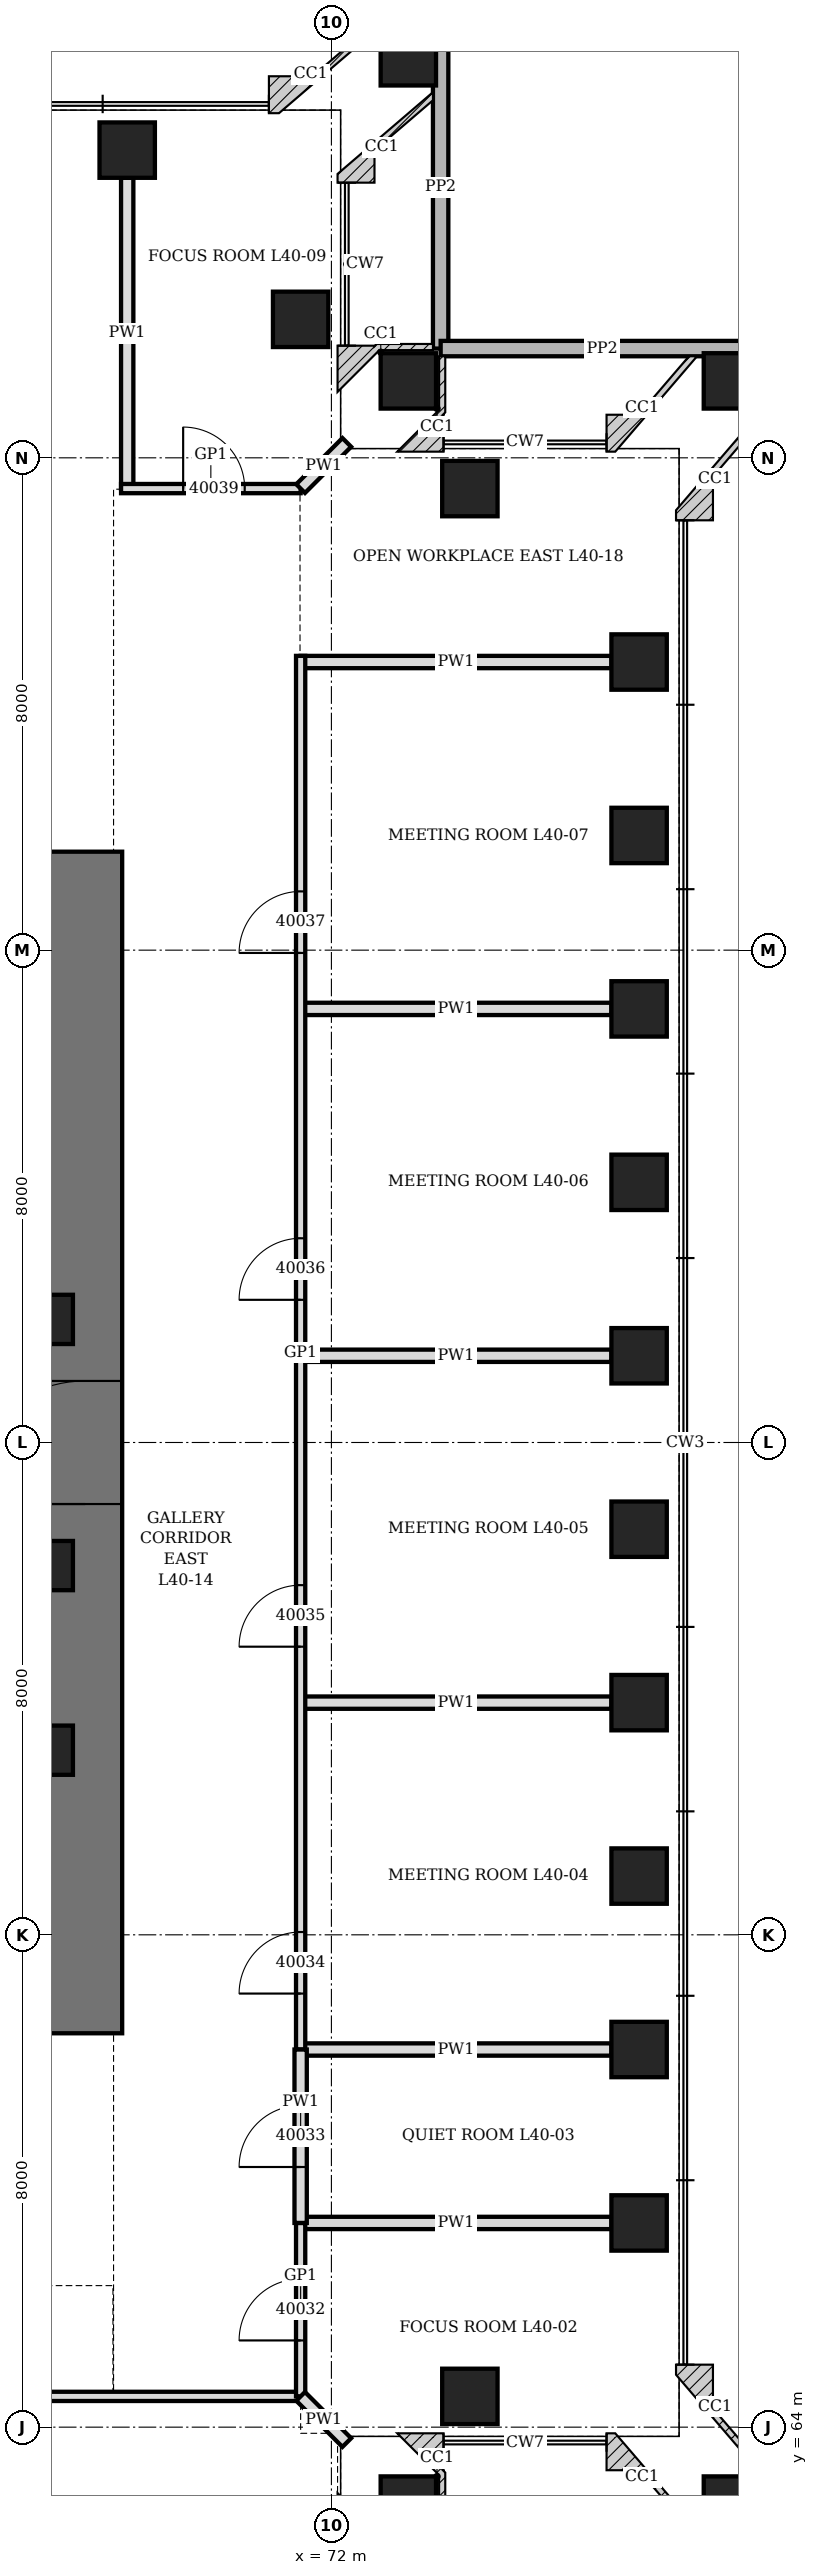
"""IFC4 building model, lengths in metres.
Left out: names, types, materials, properties, quantities, classifications, styles, units other than length and angle.
Written with IfcOpenShell. Run it as: python <this file> out.ifc"""

import sys

from ifc_helpers import new_model, si_unit, direction, frame, frame_2d, origin, origin_2d, place, context, subcontext, project, spatial, rectangle, hollow_rectangle, extrude, clip, halfspace, element, fill, save


model = new_model("IFC4")
c1 = context("Model", 3, precision=1e-05, world=origin(), true_north=direction((0.0, 1.0)))
c2 = subcontext(c1, "Body", "Model", "MODEL_VIEW")
j1 = project(units=[si_unit("LENGTHUNIT", "METRE"), si_unit("PLANEANGLEUNIT", "RADIAN")], contexts=[c1])
p1 = place(None, origin())
s1 = spatial("IfcSite", under=j1, at=p1, CompositionType="ELEMENT")
p2 = place(p1, origin())
s2 = spatial("IfcBuilding", under=s1, at=p2, CompositionType="ELEMENT")
p3 = place(p2, frame((0.0, 0.0, 181.3)))
s3 = spatial("IfcBuildingStorey", under=s2, at=p3, CompositionType="ELEMENT", Elevation=181.3)
p4 = place(p3, frame((73.25, 62.75, -0.25), z_axis=(-0.343685624304, 0.343685624304, 0.873933855216), x_axis=(-0.707106781187, -0.707106781187, 0.0)))
e1 = element("IfcColumn", 1, at=p4, inside=s3, PredefinedType="COLUMN", context=c2, shape_type="Clipping", body=[
    clip(clip(extrude(hollow_rectangle(XDim=0.9, YDim=0.9, WallThickness=0.15, at=origin_2d()), origin(), (0.0, 0.0, 1.0), 5.092), halfspace(frame((0.0, 0.0, 0.253), z_axis=(0.0, 0.0, 1.0), x_axis=(1.0, 0.0, 0.0)), True)), halfspace(frame((0.0, 0.0, 4.839), z_axis=(0.0, 0.0, -1.0), x_axis=(1.0, 0.0, 0.0)), True)),
])
p5 = place(p3, frame((74.25, 64.5, -0.25), z_axis=(0.0, 0.0, 1.0), x_axis=(1.0, 0.0, 0.0)))
e2 = element("IfcColumn", 2, at=p5, inside=s3, PredefinedType="COLUMN", context=c2, shape_type="SweptSolid", body=[
    extrude(hollow_rectangle(XDim=0.9, YDim=0.9, WallThickness=0.15, at=origin_2d()), origin(), (0.0, 0.0, 1.0), 4.45),
])
p6 = place(p3, frame((78.5, 62.75, -0.25), z_axis=(-0.299314960964, 0.349200787792, 0.887957974202), x_axis=(-0.759256602365, -0.650791373456, 0.0)))
e3 = element("IfcColumn", 3, at=p6, inside=s3, PredefinedType="COLUMN", context=c2, shape_type="Clipping", body=[
    clip(clip(extrude(hollow_rectangle(XDim=0.9, YDim=0.9, WallThickness=0.15, at=origin_2d()), origin(), (0.0, 0.0, 1.0), 5.011), halfspace(frame((0.0, 0.0, 0.235), z_axis=(0.0, 0.0, 1.0), x_axis=(1.0, 0.0, 0.0)), True)), halfspace(frame((0.0, 0.0, 4.776), z_axis=(0.0, 0.0, -1.0), x_axis=(1.0, 0.0, 0.0)), True)),
])
for number, where, z_axis, x_axis in (
    (4, (77.0, 67.318, -0.25), (0.0, 0.0, 1.0), (0.0, 1.0, 0.0)),
    (5, (77.0, 70.136, -0.25), (0.0, 0.0, 1.0), (0.0, 1.0, 0.0)),
    (6, (77.0, 72.955, -0.25), (0.0, 0.0, 1.0), (0.0, 1.0, 0.0)),
    (7, (77.0, 75.773, -0.25), (0.0, 0.0, 1.0), (0.0, 1.0, 0.0)),
    (8, (77.0, 78.591, -0.25), (0.0, 0.0, 1.0), (0.0, 1.0, 0.0)),
    (9, (77.0, 81.409, -0.25), (0.0, 0.0, 1.0), (0.0, 1.0, 0.0)),
    (10, (77.0, 84.227, -0.25), (0.0, 0.0, 1.0), (0.0, 1.0, 0.0)),
    (11, (77.0, 87.045, -0.25), (0.0, 0.0, 1.0), (0.0, 1.0, 0.0)),
    (12, (77.0, 89.864, -0.25), (0.0, 0.0, 1.0), (0.0, 1.0, 0.0)),
    (13, (77.0, 92.682, -0.25), (0.0, 0.0, 1.0), (0.0, 1.0, 0.0)),
):
    element("IfcColumn", number, at=place(p3, frame(where, z_axis=z_axis, x_axis=x_axis)), inside=s3, PredefinedType="COLUMN", context=c2, shape_type="SweptSolid", body=[
        extrude(hollow_rectangle(XDim=0.9, YDim=0.9, WallThickness=0.15, at=origin_2d()), origin(), (0.0, 0.0, 1.0), 4.45),
    ])
p7 = place(p3, frame((78.5, 97.25, -0.25), z_axis=(-0.299314960964, -0.349200787792, 0.887957974202), x_axis=(0.759256602365, -0.650791373456, 0.0)))
e14 = element("IfcColumn", 14, at=p7, inside=s3, PredefinedType="COLUMN", context=c2, shape_type="Clipping", body=[
    clip(clip(extrude(hollow_rectangle(XDim=0.9, YDim=0.9, WallThickness=0.15, at=origin_2d()), origin(), (0.0, 0.0, 1.0), 5.011), halfspace(frame((0.0, 0.0, 0.235), z_axis=(0.0, 0.0, 1.0), x_axis=(1.0, 0.0, 0.0)), True)), halfspace(frame((0.0, 0.0, 4.776), z_axis=(0.0, 0.0, -1.0), x_axis=(1.0, 0.0, 0.0)), True)),
])
p8 = place(p3, frame((74.25, 95.5, -0.25), z_axis=(0.0, 0.0, 1.0), x_axis=(1.0, 0.0, 0.0)))
e15 = element("IfcColumn", 15, at=p8, inside=s3, PredefinedType="COLUMN", context=c2, shape_type="SweptSolid", body=[
    extrude(hollow_rectangle(XDim=0.9, YDim=0.9, WallThickness=0.15, at=origin_2d()), origin(), (0.0, 0.0, 1.0), 4.45),
])
p9 = place(p3, frame((73.25, 97.25, -0.25), z_axis=(-0.343685624304, -0.343685624304, 0.873933855216), x_axis=(0.707106781187, -0.707106781187, 0.0)))
e16 = element("IfcColumn", 16, at=p9, inside=s3, PredefinedType="COLUMN", context=c2, shape_type="Clipping", body=[
    clip(clip(extrude(hollow_rectangle(XDim=0.9, YDim=0.9, WallThickness=0.15, at=origin_2d()), origin(), (0.0, 0.0, 1.0), 5.092), halfspace(frame((0.0, 0.0, 0.253), z_axis=(0.0, 0.0, 1.0), x_axis=(1.0, 0.0, 0.0)), True)), halfspace(frame((0.0, 0.0, 4.839), z_axis=(0.0, 0.0, -1.0), x_axis=(1.0, 0.0, 0.0)), True)),
])
p10 = place(p3, frame((71.5, 98.25, -0.25), z_axis=(0.0, 0.0, 1.0), x_axis=(0.0, 1.0, 0.0)))
e17 = element("IfcColumn", 17, at=p10, inside=s3, PredefinedType="COLUMN", context=c2, shape_type="SweptSolid", body=[
    extrude(hollow_rectangle(XDim=0.9, YDim=0.9, WallThickness=0.15, at=origin_2d()), origin(), (0.0, 0.0, 1.0), 4.45),
])
p11 = place(p3, frame((73.25, 102.5, -0.25), z_axis=(-0.349200787792, -0.299314960964, 0.887957974202), x_axis=(0.650791373456, -0.759256602365, 0.0)))
e18 = element("IfcColumn", 18, at=p11, inside=s3, PredefinedType="COLUMN", context=c2, shape_type="Clipping", body=[
    clip(clip(extrude(hollow_rectangle(XDim=0.9, YDim=0.9, WallThickness=0.15, at=origin_2d()), origin(), (0.0, 0.0, 1.0), 5.011), halfspace(frame((0.0, 0.0, 0.235), z_axis=(0.0, 0.0, 1.0), x_axis=(1.0, 0.0, 0.0)), True)), halfspace(frame((0.0, 0.0, 4.776), z_axis=(0.0, 0.0, -1.0), x_axis=(1.0, 0.0, 0.0)), True)),
])
p12 = place(p3, frame((68.682, 101.0, -0.25), z_axis=(0.0, 0.0, 1.0), x_axis=(1.0, 0.0, 0.0)))
e19 = element("IfcColumn", 19, at=p12, inside=s3, PredefinedType="COLUMN", context=c2, shape_type="SweptSolid", body=[
    extrude(hollow_rectangle(XDim=0.9, YDim=0.9, WallThickness=0.15, at=origin_2d()), origin(), (0.0, 0.0, 1.0), 4.45),
])
p13 = place(p3, frame((68.0, 70.4, 0.0), z_axis=(0.0, 0.0, 1.0), x_axis=(0.0, 1.0, 0.0)))
e20 = element("IfcWall", 20, at=p13, inside=s3, PredefinedType="SHEAR", context=c2, shape_type="SweptSolid", body=[
    extrude(rectangle(XDim=19.2, YDim=1.2, at=frame_2d((9.6, 0.0))), origin(), (0.0, 0.0, 1.0), 4.2),
])
p14 = place(p13, frame((8.6, 0.0, 0.0)))
e21 = element("IfcOpeningElement", 21, at=p14, cuts=e20, PredefinedType="OPENING", context=c2, shape_type="SweptSolid", body=[
    extrude(rectangle(XDim=2.0, YDim=2.4, at=frame_2d((1.0, 1.2))), frame((0.0, 0.61, 0.0), z_axis=(0.0, -1.0, 0.0), x_axis=(1.0, 0.0, 0.0)), (0.0, 0.0, 1.0), 1.22),
])
for number, where, z_axis, x_axis in (
    (22, (67.4, 75.0, 0.0), (0.0, 0.0, 1.0), (1.0, 0.0, 0.0)),
    (23, (67.4, 78.0, 0.0), (0.0, 0.0, 1.0), (1.0, 0.0, 0.0)),
    (24, (67.4, 82.0, 0.0), (0.0, 0.0, 1.0), (1.0, 0.0, 0.0)),
):
    element("IfcColumn", number, at=place(p3, frame(where, z_axis=z_axis, x_axis=x_axis)), inside=s3, PredefinedType="COLUMN", context=c2, shape_type="SweptSolid", body=[
        extrude(hollow_rectangle(XDim=0.8, YDim=0.8, WallThickness=0.1, at=origin_2d()), origin(), (0.0, 0.0, 1.0), 4.2),
    ])
for number, where, z_axis, x_axis in (
    (25, (73.775, 103.025, 0.0), (0.0, 0.0, 1.0), (0.0, -1.0, 0.0)),
    (26, (73.775, 97.775, 0.0), (0.0, 0.0, 1.0), (1.0, 0.0, 0.0)),
):
    element("IfcWall", number, at=place(p3, frame(where, z_axis=z_axis, x_axis=x_axis)), inside=s3, PredefinedType="PARAPET", context=c2, shape_type="SweptSolid", body=[
        extrude(rectangle(XDim=5.25, YDim=0.25, at=frame_2d((2.625, 0.0))), origin(), (0.0, 0.0, 1.0), 1.1),
    ])
for number, where, z_axis, x_axis in (
    (27, (71.5, 67.318, 0.0), (0.0, 0.0, 1.0), (1.0, 0.0, 0.0)),
    (28, (71.5, 70.136, 0.0), (0.0, 0.0, 1.0), (1.0, 0.0, 0.0)),
    (29, (71.5, 75.773, 0.0), (0.0, 0.0, 1.0), (1.0, 0.0, 0.0)),
    (30, (71.5, 81.409, 0.0), (0.0, 0.0, 1.0), (1.0, 0.0, 0.0)),
    (31, (71.5, 87.045, 0.0), (0.0, 0.0, 1.0), (1.0, 0.0, 0.0)),
    (32, (71.5, 92.682, 0.0), (0.0, 0.0, 1.0), (1.0, 0.0, 0.0)),
    (33, (68.682, 95.5, 0.0), (0.0, 0.0, 1.0), (0.0, 1.0, 0.0)),
):
    element("IfcWall", number, at=place(p3, frame(where, z_axis=z_axis, x_axis=x_axis)), inside=s3, PredefinedType="PARTITIONING", context=c2, shape_type="SweptSolid", body=[
        extrude(rectangle(XDim=5.05, YDim=0.2, at=frame_2d((2.525, 0.0))), origin(), (0.0, 0.0, 1.0), 3.428),
    ])
p15 = place(p3, frame((60.127, 64.5, 0.0), z_axis=(0.0, 0.0, 1.0), x_axis=(1.0, 0.0, 0.0)))
e34 = element("IfcWall", 34, at=p15, inside=s3, PredefinedType="PARTITIONING", context=c2, shape_type="SweptSolid", body=[
    extrude(rectangle(XDim=11.373, YDim=0.15, at=frame_2d((5.687, 0.0))), origin(), (0.0, 0.0, 1.0), 4.04),
])
p16 = place(p15, frame((3.827, 0.0, 0.0)))
e35 = element("IfcOpeningElement", 35, at=p16, cuts=e34, PredefinedType="OPENING", context=c2, shape_type="SweptSolid", body=[
    extrude(rectangle(XDim=1.0, YDim=2.4, at=frame_2d((0.5, 1.2))), frame((0.0, 0.085, 0.0), z_axis=(0.0, -1.0, 0.0), x_axis=(1.0, 0.0, 0.0)), (0.0, 0.0, 1.0), 0.17),
])
p17 = place(p3, frame((68.582, 95.5, 0.0), z_axis=(0.0, 0.0, 1.0), x_axis=(1.0, 0.0, 0.0)))
e36 = element("IfcWall", 36, at=p17, inside=s3, PredefinedType="PARTITIONING", context=c2, shape_type="SweptSolid", body=[
    extrude(rectangle(XDim=2.918, YDim=0.15, at=frame_2d((1.459, 0.0))), origin(), (0.0, 0.0, 1.0), 4.04),
])
p18 = place(p17, frame((1.009, 0.0, 0.0)))
e37 = element("IfcOpeningElement", 37, at=p18, cuts=e36, PredefinedType="OPENING", context=c2, shape_type="SweptSolid", body=[
    extrude(rectangle(XDim=1.0, YDim=2.4, at=frame_2d((0.5, 1.2))), frame((0.0, 0.085, 0.0), z_axis=(0.0, -1.0, 0.0), x_axis=(1.0, 0.0, 0.0)), (0.0, 0.0, 1.0), 0.17),
])
p19 = place(p3, frame((71.5, 64.5, 0.0), z_axis=(0.0, 0.0, 1.0), x_axis=(0.0, 1.0, 0.0)))
e38 = element("IfcWall", 38, at=p19, inside=s3, PredefinedType="PARTITIONING", context=c2, shape_type="SweptSolid", body=[
    extrude(rectangle(XDim=2.818, YDim=0.15, at=frame_2d((1.409, 0.0))), origin(), (0.0, 0.0, 1.0), 4.04),
])
p20 = place(p19, frame((0.909, 0.0, 0.0)))
e39 = element("IfcOpeningElement", 39, at=p20, cuts=e38, PredefinedType="OPENING", context=c2, shape_type="SweptSolid", body=[
    extrude(rectangle(XDim=1.0, YDim=2.4, at=frame_2d((0.5, 1.2))), frame((0.0, 0.085, 0.0), z_axis=(0.0, -1.0, 0.0), x_axis=(1.0, 0.0, 0.0)), (0.0, 0.0, 1.0), 0.17),
])
p21 = place(p3, frame((71.5, 70.136, 0.0), z_axis=(0.0, 0.0, 1.0), x_axis=(0.0, 1.0, 0.0)))
e40 = element("IfcWall", 40, at=p21, inside=s3, PredefinedType="PARTITIONING", context=c2, shape_type="SweptSolid", body=[
    extrude(rectangle(XDim=22.645, YDim=0.15, at=frame_2d((11.323, 0.0))), origin(), (0.0, 0.0, 1.0), 4.04),
])
p22 = place(p21, frame((0.909, 0.0, 0.0)))
e41 = element("IfcOpeningElement", 41, at=p22, cuts=e40, PredefinedType="OPENING", context=c2, shape_type="SweptSolid", body=[
    extrude(rectangle(XDim=1.0, YDim=2.4, at=frame_2d((0.5, 1.2))), frame((0.0, 0.085, 0.0), z_axis=(0.0, -1.0, 0.0), x_axis=(1.0, 0.0, 0.0)), (0.0, 0.0, 1.0), 0.17),
])
p23 = place(p21, frame((6.545, 0.0, 0.0)))
e42 = element("IfcOpeningElement", 42, at=p23, cuts=e40, PredefinedType="OPENING", context=c2, shape_type="SweptSolid", body=[
    extrude(rectangle(XDim=1.0, YDim=2.4, at=frame_2d((0.5, 1.2))), frame((0.0, 0.085, 0.0), z_axis=(0.0, -1.0, 0.0), x_axis=(1.0, 0.0, 0.0)), (0.0, 0.0, 1.0), 0.17),
])
p24 = place(p21, frame((12.182, 0.0, 0.0)))
e43 = element("IfcOpeningElement", 43, at=p24, cuts=e40, PredefinedType="OPENING", context=c2, shape_type="SweptSolid", body=[
    extrude(rectangle(XDim=1.0, YDim=2.4, at=frame_2d((0.5, 1.2))), frame((0.0, 0.085, 0.0), z_axis=(0.0, -1.0, 0.0), x_axis=(1.0, 0.0, 0.0)), (0.0, 0.0, 1.0), 0.17),
])
p25 = place(p21, frame((17.818, 0.0, 0.0)))
e44 = element("IfcOpeningElement", 44, at=p25, cuts=e40, PredefinedType="OPENING", context=c2, shape_type="SweptSolid", body=[
    extrude(rectangle(XDim=1.0, YDim=2.4, at=frame_2d((0.5, 1.2))), frame((0.0, 0.085, 0.0), z_axis=(0.0, -1.0, 0.0), x_axis=(1.0, 0.0, 0.0)), (0.0, 0.0, 1.0), 0.17),
])
p26 = place(p3, frame((71.5, 67.318, 0.0), z_axis=(0.0, 0.0, 1.0), x_axis=(0.0, 1.0, 0.0)))
e45 = element("IfcWall", 45, at=p26, inside=s3, PredefinedType="PARTITIONING", context=c2, shape_type="SweptSolid", body=[
    extrude(rectangle(XDim=2.818, YDim=0.2, at=frame_2d((1.409, 0.0))), origin(), (0.0, 0.0, 1.0), 4.04),
])
p27 = place(p26, frame((0.909, 0.0, 0.0)))
e46 = element("IfcOpeningElement", 46, at=p27, cuts=e45, PredefinedType="OPENING", context=c2, shape_type="SweptSolid", body=[
    extrude(rectangle(XDim=1.0, YDim=2.1, at=frame_2d((0.5, 1.05))), frame((0.0, 0.11, 0.0), z_axis=(0.0, -1.0, 0.0), x_axis=(1.0, 0.0, 0.0)), (0.0, 0.0, 1.0), 0.22),
])
for number, where, z_axis, x_axis in (
    (47, (71.5, 64.5, 0.0), (0.0, 0.0, 1.0), (0.707, -0.707, 0.0)),
    (48, (71.5, 95.5, 0.0), (0.0, 0.0, 1.0), (0.707, 0.707, 0.0)),
):
    element("IfcWall", number, at=place(p3, frame(where, z_axis=z_axis, x_axis=x_axis)), inside=s3, PredefinedType="PARTITIONING", context=c2, shape_type="SweptSolid", body=[
        extrude(rectangle(XDim=1.061, YDim=0.2, at=frame_2d((0.53, 0.0))), origin(), (0.0, 0.0, 1.0), 4.04),
    ])
p28 = place(p14, origin())
e49 = element("IfcDoor", 49, at=p28, inside=s3, OperationType="DOUBLE_DOOR_SINGLE_SWING", PredefinedType="DOOR", context=c2, shape_type="SweptSolid", body=[
    extrude(rectangle(XDim=2.0, YDim=2.4, at=frame_2d((1.0, 1.2))), frame((0.0, 0.35, 0.0), z_axis=(0.0, -1.0, 0.0), x_axis=(1.0, 0.0, 0.0)), (0.0, 0.0, 1.0), 0.7),
])
fill(e21, e49)
p29 = place(p20, origin())
e50 = element("IfcDoor", 50, at=p29, inside=s3, OperationType="SINGLE_SWING_RIGHT", PredefinedType="DOOR", context=c2, shape_type="SweptSolid", body=[
    extrude(rectangle(XDim=1.0, YDim=2.4, at=frame_2d((0.5, 1.2))), frame((0.0, 0.075, 0.0), z_axis=(0.0, -1.0, 0.0), x_axis=(1.0, 0.0, 0.0)), (0.0, 0.0, 1.0), 0.149),
])
fill(e39, e50)
p30 = place(p27, origin())
e51 = element("IfcDoor", 51, at=p30, inside=s3, OperationType="SINGLE_SWING_LEFT", PredefinedType="DOOR", context=c2, shape_type="SweptSolid", body=[
    extrude(rectangle(XDim=1.0, YDim=2.1, at=frame_2d((0.5, 1.05))), frame((0.0, 0.1, 0.0), z_axis=(0.0, -1.0, 0.0), x_axis=(1.0, 0.0, 0.0)), (0.0, 0.0, 1.0), 0.199),
])
fill(e46, e51)
p31 = place(p22, origin())
e52 = element("IfcDoor", 52, at=p31, inside=s3, OperationType="SINGLE_SWING_RIGHT", PredefinedType="DOOR", context=c2, shape_type="SweptSolid", body=[
    extrude(rectangle(XDim=1.0, YDim=2.4, at=frame_2d((0.5, 1.2))), frame((0.0, 0.075, 0.0), z_axis=(0.0, -1.0, 0.0), x_axis=(1.0, 0.0, 0.0)), (0.0, 0.0, 1.0), 0.149),
])
fill(e41, e52)
p32 = place(p23, origin())
e53 = element("IfcDoor", 53, at=p32, inside=s3, OperationType="SINGLE_SWING_RIGHT", PredefinedType="DOOR", context=c2, shape_type="SweptSolid", body=[
    extrude(rectangle(XDim=1.0, YDim=2.4, at=frame_2d((0.5, 1.2))), frame((0.0, 0.075, 0.0), z_axis=(0.0, -1.0, 0.0), x_axis=(1.0, 0.0, 0.0)), (0.0, 0.0, 1.0), 0.149),
])
fill(e42, e53)
p33 = place(p24, origin())
e54 = element("IfcDoor", 54, at=p33, inside=s3, OperationType="SINGLE_SWING_RIGHT", PredefinedType="DOOR", context=c2, shape_type="SweptSolid", body=[
    extrude(rectangle(XDim=1.0, YDim=2.4, at=frame_2d((0.5, 1.2))), frame((0.0, 0.075, 0.0), z_axis=(0.0, -1.0, 0.0), x_axis=(1.0, 0.0, 0.0)), (0.0, 0.0, 1.0), 0.149),
])
fill(e43, e54)
p34 = place(p25, origin())
e55 = element("IfcDoor", 55, at=p34, inside=s3, OperationType="SINGLE_SWING_RIGHT", PredefinedType="DOOR", context=c2, shape_type="SweptSolid", body=[
    extrude(rectangle(XDim=1.0, YDim=2.4, at=frame_2d((0.5, 1.2))), frame((0.0, 0.075, 0.0), z_axis=(0.0, -1.0, 0.0), x_axis=(1.0, 0.0, 0.0)), (0.0, 0.0, 1.0), 0.149),
])
fill(e44, e55)
p35 = place(p18, origin())
e56 = element("IfcDoor", 56, at=p35, inside=s3, OperationType="SINGLE_SWING_RIGHT", PredefinedType="DOOR", context=c2, shape_type="SweptSolid", body=[
    extrude(rectangle(XDim=1.0, YDim=2.4, at=frame_2d((0.5, 1.2))), frame((0.0, 0.075, 0.0), z_axis=(0.0, -1.0, 0.0), x_axis=(1.0, 0.0, 0.0)), (0.0, 0.0, 1.0), 0.149),
])
fill(e37, e56)
save(model, sys.argv[1])
